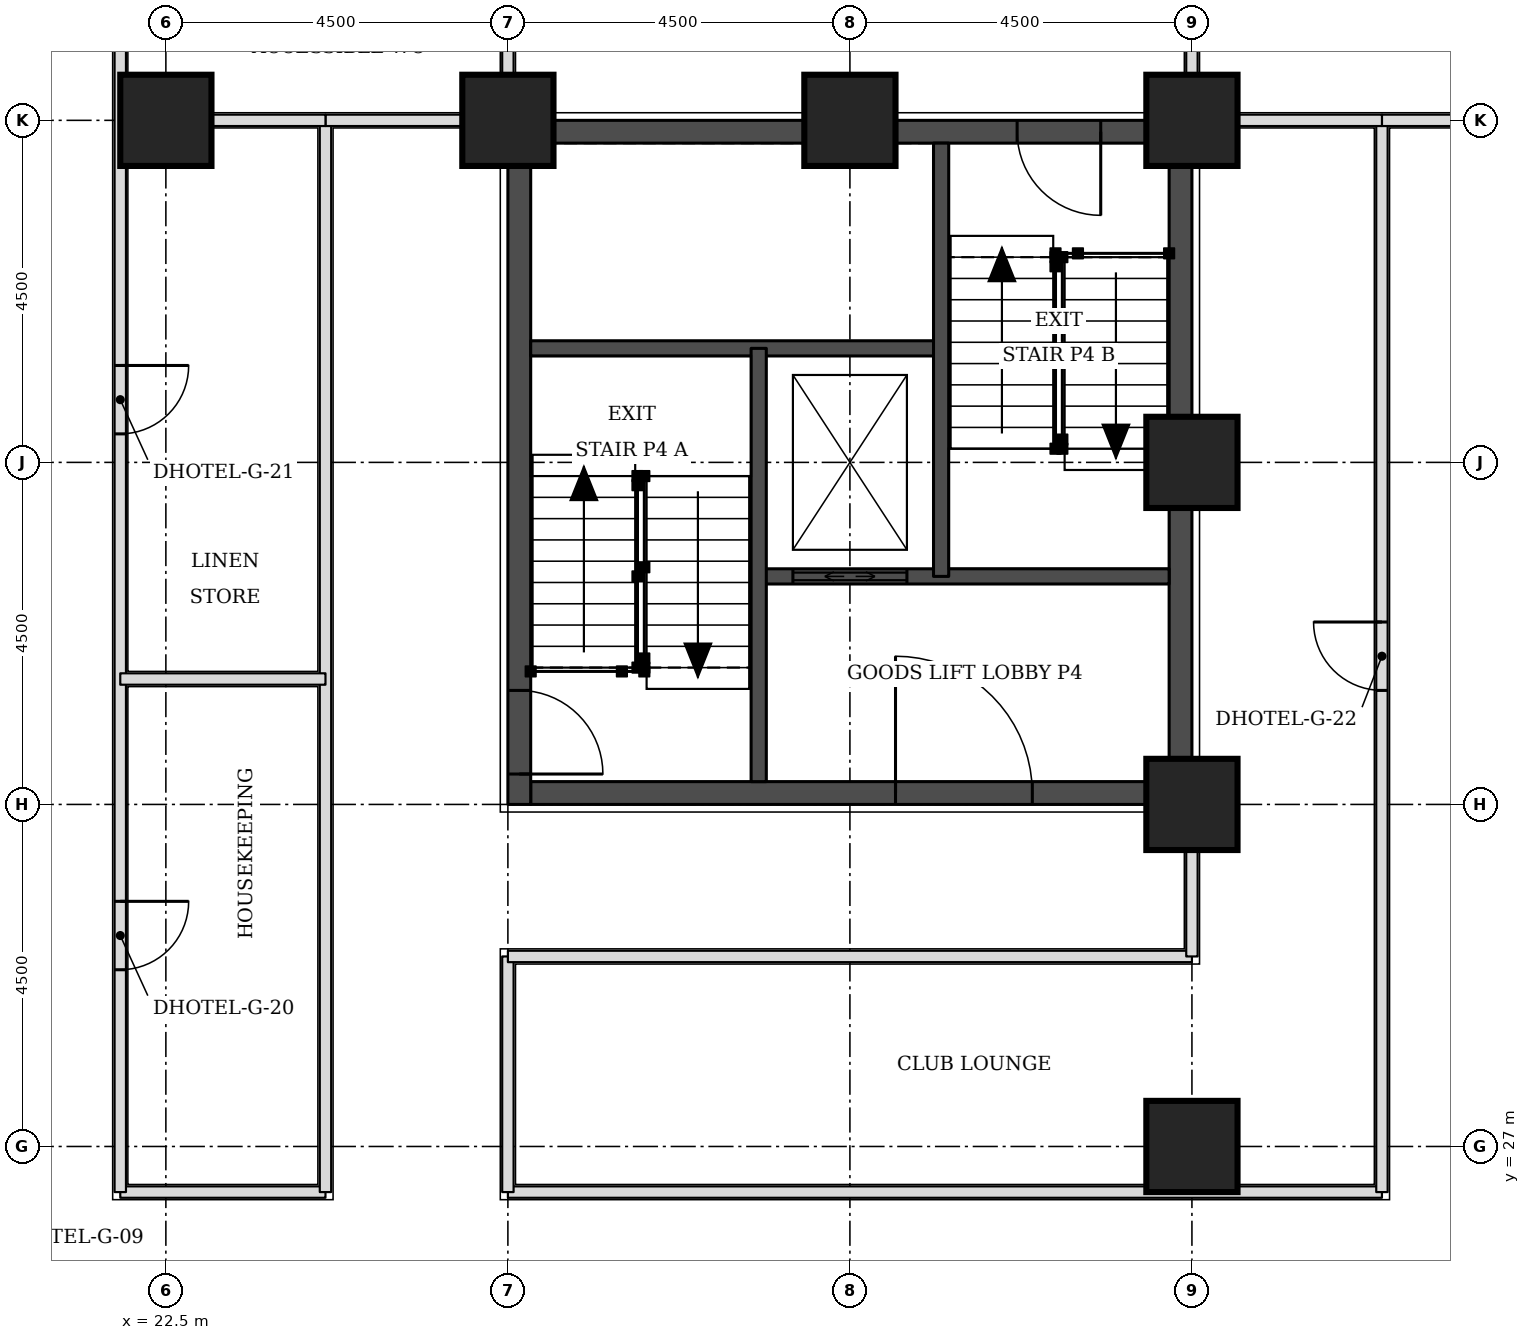
"""IFC4 building model, lengths in metres.
Left out: names, types, materials, properties, quantities, classifications, styles, units other than length and angle.
Written with IfcOpenShell. Run it as: python <this file> out.ifc"""

import sys

from ifc_helpers import new_model, si_unit, direction, frame, frame_2d, origin, origin_2d, place, context, subcontext, project, spatial, rectangle, extrude, element, fill, save


model = new_model("IFC4")
c1 = context("Model", 3, precision=1e-05, world=origin(), true_north=direction((0.0, 1.0)))
c2 = subcontext(c1, "Body", "Model", "MODEL_VIEW")
j1 = project(units=[si_unit("LENGTHUNIT", "METRE"), si_unit("PLANEANGLEUNIT", "RADIAN")], contexts=[c1])
p1 = place(None, origin())
s1 = spatial("IfcSite", under=j1, at=p1, CompositionType="ELEMENT")
p2 = place(p1, origin())
s2 = spatial("IfcBuilding", under=s1, at=p2, CompositionType="ELEMENT")
p3 = place(p2, frame((0.0, 0.0, 66.0)))
s3 = spatial("IfcBuildingStorey", under=s2, at=p3, CompositionType="ELEMENT", Elevation=66.0)
for number, where, z_axis, x_axis in (
    (1, (36.0, 27.0, 0.0), (0.0, 0.0, 1.0), (1.0, 0.0, 0.0)),
    (2, (36.0, 31.5, 0.0), (0.0, 0.0, 1.0), (1.0, 0.0, 0.0)),
    (3, (36.0, 36.0, 0.0), (0.0, 0.0, 1.0), (1.0, 0.0, 0.0)),
    (4, (22.5, 40.5, 0.0), (0.0, 0.0, 1.0), (1.0, 0.0, 0.0)),
    (5, (27.0, 40.5, 0.0), (0.0, 0.0, 1.0), (1.0, 0.0, 0.0)),
    (6, (31.5, 40.5, 0.0), (0.0, 0.0, 1.0), (1.0, 0.0, 0.0)),
    (7, (36.0, 40.5, 0.0), (0.0, 0.0, 1.0), (1.0, 0.0, 0.0)),
):
    element("IfcColumn", number, at=place(p3, frame(where, z_axis=z_axis, x_axis=x_axis)), inside=s3, PredefinedType="COLUMN", context=c2, shape_type="SweptSolid", body=[
        extrude(rectangle(XDim=1.2, YDim=1.2, at=origin_2d()), origin(), (0.0, 0.0, 1.0), 3.3),
    ])
p4 = place(p3, frame((27.3, 31.65, 0.0), z_axis=(0.0, 0.0, 1.0), x_axis=(1.0, 0.0, 0.0)))
e8 = element("IfcWall", 8, at=p4, inside=s3, PredefinedType="SHEAR", context=c2, shape_type="SweptSolid", body=[
    extrude(rectangle(XDim=8.4, YDim=0.3, at=frame_2d((4.2, 0.0))), origin(), (0.0, 0.0, 1.0), 3.3),
])
p5 = place(p4, frame((4.8, 0.0, 0.0)))
e9 = element("IfcOpeningElement", 9, at=p5, cuts=e8, PredefinedType="OPENING", context=c2, shape_type="SweptSolid", body=[
    extrude(rectangle(XDim=1.8, YDim=2.1, at=frame_2d((0.9, 1.05))), frame((0.0, 0.16, 0.0), z_axis=(0.0, -1.0, 0.0), x_axis=(1.0, 0.0, 0.0)), (0.0, 0.0, 1.0), 0.32),
])
p6 = place(p3, frame((27.3, 40.35, 0.0), z_axis=(0.0, 0.0, 1.0), x_axis=(1.0, 0.0, 0.0)))
e10 = element("IfcWall", 10, at=p6, inside=s3, PredefinedType="SHEAR", context=c2, shape_type="SweptSolid", body=[
    extrude(rectangle(XDim=8.4, YDim=0.3, at=frame_2d((4.2, 0.0))), origin(), (0.0, 0.0, 1.0), 3.3),
])
p7 = place(p6, frame((6.4, 0.0, 0.0)))
e11 = element("IfcOpeningElement", 11, at=p7, cuts=e10, PredefinedType="OPENING", context=c2, shape_type="SweptSolid", body=[
    extrude(rectangle(XDim=1.1, YDim=2.1, at=frame_2d((0.55, 1.05))), frame((0.0, 0.16, 0.0), z_axis=(0.0, -1.0, 0.0), x_axis=(1.0, 0.0, 0.0)), (0.0, 0.0, 1.0), 0.32),
])
p8 = place(p3, frame((27.15, 31.5, 0.0), z_axis=(0.0, 0.0, 1.0), x_axis=(0.0, 1.0, 0.0)))
e12 = element("IfcWall", 12, at=p8, inside=s3, PredefinedType="SHEAR", context=c2, shape_type="SweptSolid", body=[
    extrude(rectangle(XDim=9.0, YDim=0.3, at=frame_2d((4.5, 0.0))), origin(), (0.0, 0.0, 1.0), 3.3),
])
p9 = place(p8, frame((0.4, 0.0, 0.0)))
e13 = element("IfcOpeningElement", 13, at=p9, cuts=e12, PredefinedType="OPENING", context=c2, shape_type="SweptSolid", body=[
    extrude(rectangle(XDim=1.1, YDim=2.1, at=frame_2d((0.55, 1.05))), frame((0.0, 0.16, 0.0), z_axis=(0.0, -1.0, 0.0), x_axis=(1.0, 0.0, 0.0)), (0.0, 0.0, 1.0), 0.32),
])
p10 = place(p3, frame((35.85, 31.5, 0.0), z_axis=(0.0, 0.0, 1.0), x_axis=(0.0, 1.0, 0.0)))
e14 = element("IfcWall", 14, at=p10, inside=s3, PredefinedType="SHEAR", context=c2, shape_type="SweptSolid", body=[
    extrude(rectangle(XDim=9.0, YDim=0.3, at=frame_2d((4.5, 0.0))), origin(), (0.0, 0.0, 1.0), 3.3),
])
p11 = place(p3, frame((21.9, 26.4, 0.0), z_axis=(0.0, 0.0, 1.0), x_axis=(1.0, 0.0, 0.0)))
e15 = element("IfcWall", 15, at=p11, inside=s3, PredefinedType="PARTITIONING", context=c2, shape_type="SweptSolid", body=[
    extrude(rectangle(XDim=2.7, YDim=0.15, at=frame_2d((1.35, 0.0))), origin(), (0.0, 0.0, 1.0), 3.08),
])
p12 = place(p3, frame((21.9, 26.4, 0.0), z_axis=(0.0, 0.0, 1.0), x_axis=(0.0, 1.0, 0.0)))
e16 = element("IfcWall", 16, at=p12, inside=s3, PredefinedType="PARTITIONING", context=c2, shape_type="SweptSolid", body=[
    extrude(rectangle(XDim=16.6, YDim=0.15, at=frame_2d((8.3, 0.0))), origin(), (0.0, 0.0, 1.0), 3.08),
])
p13 = place(p12, frame((2.925, 0.0, 0.0)))
e17 = element("IfcOpeningElement", 17, at=p13, cuts=e16, PredefinedType="OPENING", context=c2, shape_type="SweptSolid", body=[
    extrude(rectangle(XDim=0.9, YDim=2.1, at=frame_2d((0.45, 1.05))), frame((0.0, 0.085, 0.0), z_axis=(0.0, -1.0, 0.0), x_axis=(1.0, 0.0, 0.0)), (0.0, 0.0, 1.0), 0.17),
])
p14 = place(p12, frame((9.975, 0.0, 0.0)))
e18 = element("IfcOpeningElement", 18, at=p14, cuts=e16, PredefinedType="OPENING", context=c2, shape_type="SweptSolid", body=[
    extrude(rectangle(XDim=0.9, YDim=2.1, at=frame_2d((0.45, 1.05))), frame((0.0, 0.085, 0.0), z_axis=(0.0, -1.0, 0.0), x_axis=(1.0, 0.0, 0.0)), (0.0, 0.0, 1.0), 0.17),
])
p15 = place(p3, frame((24.6, 26.4, 0.0), z_axis=(0.0, 0.0, 1.0), x_axis=(0.0, 1.0, 0.0)))
e19 = element("IfcWall", 19, at=p15, inside=s3, PredefinedType="PARTITIONING", context=c2, shape_type="SweptSolid", body=[
    extrude(rectangle(XDim=14.1, YDim=0.15, at=frame_2d((7.05, 0.0))), origin(), (0.0, 0.0, 1.0), 3.08),
])
p16 = place(p3, frame((27.0, 26.4, 0.0), z_axis=(0.0, 0.0, 1.0), x_axis=(1.0, 0.0, 0.0)))
e20 = element("IfcWall", 20, at=p16, inside=s3, PredefinedType="PARTITIONING", context=c2, shape_type="SweptSolid", body=[
    extrude(rectangle(XDim=11.5, YDim=0.15, at=frame_2d((5.75, 0.0))), origin(), (0.0, 0.0, 1.0), 3.08),
])
p17 = place(p3, frame((27.0, 26.4, 0.0), z_axis=(0.0, 0.0, 1.0), x_axis=(0.0, 1.0, 0.0)))
e21 = element("IfcWall", 21, at=p17, inside=s3, PredefinedType="PARTITIONING", context=c2, shape_type="SweptSolid", body=[
    extrude(rectangle(XDim=3.1, YDim=0.15, at=frame_2d((1.55, 0.0))), origin(), (0.0, 0.0, 1.0), 3.08),
])
p18 = place(p3, frame((38.5, 26.4, 0.0), z_axis=(0.0, 0.0, 1.0), x_axis=(0.0, 1.0, 0.0)))
e22 = element("IfcWall", 22, at=p18, inside=s3, PredefinedType="PARTITIONING", context=c2, shape_type="SweptSolid", body=[
    extrude(rectangle(XDim=14.1, YDim=0.15, at=frame_2d((7.05, 0.0))), origin(), (0.0, 0.0, 1.0), 3.08),
])
p19 = place(p18, frame((6.6, 0.0, 0.0)))
e23 = element("IfcOpeningElement", 23, at=p19, cuts=e22, PredefinedType="OPENING", context=c2, shape_type="SweptSolid", body=[
    extrude(rectangle(XDim=0.9, YDim=2.1, at=frame_2d((0.45, 1.05))), frame((0.0, 0.085, 0.0), z_axis=(0.0, -1.0, 0.0), x_axis=(1.0, 0.0, 0.0)), (0.0, 0.0, 1.0), 0.17),
])
p20 = place(p3, frame((27.0, 29.5, 0.0), z_axis=(0.0, 0.0, 1.0), x_axis=(1.0, 0.0, 0.0)))
e24 = element("IfcWall", 24, at=p20, inside=s3, PredefinedType="PARTITIONING", context=c2, shape_type="SweptSolid", body=[
    extrude(rectangle(XDim=9.0, YDim=0.15, at=frame_2d((4.5, 0.0))), origin(), (0.0, 0.0, 1.0), 3.08),
])
p21 = place(p3, frame((36.0, 29.5, 0.0), z_axis=(0.0, 0.0, 1.0), x_axis=(0.0, 1.0, 0.0)))
e25 = element("IfcWall", 25, at=p21, inside=s3, PredefinedType="PARTITIONING", context=c2, shape_type="SweptSolid", body=[
    extrude(rectangle(XDim=1.95, YDim=0.15, at=frame_2d((0.975, 0.0))), origin(), (0.0, 0.0, 1.0), 2.33),
])
p22 = place(p3, frame((24.6, 40.5, 0.0), z_axis=(0.0, 0.0, 1.0), x_axis=(1.0, 0.0, 0.0)))
e26 = element("IfcWall", 26, at=p22, inside=s3, PredefinedType="PARTITIONING", context=c2, shape_type="SweptSolid", body=[
    extrude(rectangle(XDim=2.35, YDim=0.15, at=frame_2d((1.175, 0.0))), origin(), (0.0, 0.0, 1.0), 2.33),
])
p23 = place(p3, frame((38.5, 40.5, 0.0), z_axis=(0.0, 0.0, 1.0), x_axis=(1.0, 0.0, 0.0)))
e27 = element("IfcWall", 27, at=p23, inside=s3, PredefinedType="PARTITIONING", context=c2, shape_type="SweptSolid", body=[
    extrude(rectangle(XDim=1.95, YDim=0.15, at=frame_2d((0.975, 0.0))), origin(), (0.0, 0.0, 1.0), 2.33),
])
p24 = place(p3, frame((27.0, 40.55, 0.0), z_axis=(0.0, 0.0, 1.0), x_axis=(0.0, 1.0, 0.0)))
e28 = element("IfcWall", 28, at=p24, inside=s3, PredefinedType="PARTITIONING", context=c2, shape_type="SweptSolid", body=[
    extrude(rectangle(XDim=2.45, YDim=0.15, at=frame_2d((1.225, 0.0))), origin(), (0.0, 0.0, 1.0), 3.08),
])
p25 = place(p3, frame((36.0, 40.55, 0.0), z_axis=(0.0, 0.0, 1.0), x_axis=(0.0, 1.0, 0.0)))
e29 = element("IfcWall", 29, at=p25, inside=s3, PredefinedType="PARTITIONING", context=c2, shape_type="SweptSolid", body=[
    extrude(rectangle(XDim=4.4, YDim=0.15, at=frame_2d((2.2, 0.0))), origin(), (0.0, 0.0, 1.0), 2.33),
])
p26 = place(p3, frame((21.9, 33.15, 0.0), z_axis=(0.0, 0.0, 1.0), x_axis=(1.0, 0.0, 0.0)))
e30 = element("IfcWall", 30, at=p26, inside=s3, PredefinedType="PARTITIONING", context=c2, shape_type="SweptSolid", body=[
    extrude(rectangle(XDim=2.7, YDim=0.15, at=frame_2d((1.35, 0.0))), origin(), (0.0, 0.0, 1.0), 3.08),
])
p27 = place(p3, frame((21.9, 40.5, 0.0), z_axis=(0.0, 0.0, 1.0), x_axis=(1.0, 0.0, 0.0)))
e31 = element("IfcWall", 31, at=p27, inside=s3, PredefinedType="PARTITIONING", context=c2, shape_type="SweptSolid", body=[
    extrude(rectangle(XDim=2.7, YDim=0.15, at=frame_2d((1.35, 0.0))), origin(), (0.0, 0.0, 1.0), 2.33),
])
p28 = place(p3, frame((36.05, 40.5, 0.0), z_axis=(0.0, 0.0, 1.0), x_axis=(1.0, 0.0, 0.0)))
e32 = element("IfcWall", 32, at=p28, inside=s3, PredefinedType="PARTITIONING", context=c2, shape_type="SweptSolid", body=[
    extrude(rectangle(XDim=2.45, YDim=0.15, at=frame_2d((1.225, 0.0))), origin(), (0.0, 0.0, 1.0), 2.33),
])
p29 = place(p3, frame((30.3, 34.5, 0.0), z_axis=(0.0, 0.0, 1.0), x_axis=(1.0, 0.0, 0.0)))
e33 = element("IfcWall", 33, at=p29, inside=s3, PredefinedType="SOLIDWALL", context=c2, shape_type="SweptSolid", body=[
    extrude(rectangle(XDim=5.4, YDim=0.2, at=frame_2d((2.7, 0.0))), origin(), (0.0, 0.0, 1.0), 3.08),
])
p30 = place(p29, frame((0.45, 0.0, 0.0)))
e34 = element("IfcOpeningElement", 34, at=p30, cuts=e33, PredefinedType="OPENING", context=c2, shape_type="SweptSolid", body=[
    extrude(rectangle(XDim=1.5, YDim=2.1, at=frame_2d((0.75, 1.05))), frame((0.0, 0.11, 0.0), z_axis=(0.0, -1.0, 0.0), x_axis=(1.0, 0.0, 0.0)), (0.0, 0.0, 1.0), 0.22),
])
p31 = place(p3, frame((27.3, 37.5, 0.0), z_axis=(0.0, 0.0, 1.0), x_axis=(1.0, 0.0, 0.0)))
e35 = element("IfcWall", 35, at=p31, inside=s3, PredefinedType="SOLIDWALL", context=c2, shape_type="SweptSolid", body=[
    extrude(rectangle(XDim=5.4, YDim=0.2, at=frame_2d((2.7, 0.0))), origin(), (0.0, 0.0, 1.0), 3.08),
])
for number, where, z_axis, x_axis in (
    (36, (30.3, 31.8, 0.0), (0.0, 0.0, 1.0), (0.0, 1.0, 0.0)),
    (37, (32.7, 34.5, 0.0), (0.0, 0.0, 1.0), (0.0, 1.0, 0.0)),
):
    element("IfcWall", number, at=place(p3, frame(where, z_axis=z_axis, x_axis=x_axis)), inside=s3, PredefinedType="SOLIDWALL", context=c2, shape_type="SweptSolid", body=[
        extrude(rectangle(XDim=5.7, YDim=0.2, at=frame_2d((2.85, 0.0))), origin(), (0.0, 0.0, 1.0), 3.08),
    ])
p32 = place(p13, frame((0.9, 0.0, 0.0), z_axis=(0.0, 0.0, 1.0), x_axis=(-1.0, 0.0, 0.0)))
e38 = element("IfcDoor", 38, at=p32, inside=s3, OperationType="SINGLE_SWING_LEFT", PredefinedType="DOOR", context=c2, shape_type="SweptSolid", body=[
    extrude(rectangle(XDim=0.9, YDim=2.1, at=frame_2d((0.45, 1.05))), frame((0.0, 0.025, 0.0), z_axis=(0.0, -1.0, 0.0), x_axis=(1.0, 0.0, 0.0)), (0.0, 0.0, 1.0), 0.05),
])
fill(e17, e38)
p33 = place(p14, frame((0.9, 0.0, 0.0), z_axis=(0.0, 0.0, 1.0), x_axis=(-1.0, 0.0, 0.0)))
e39 = element("IfcDoor", 39, at=p33, inside=s3, OperationType="SINGLE_SWING_LEFT", PredefinedType="DOOR", context=c2, shape_type="SweptSolid", body=[
    extrude(rectangle(XDim=0.9, YDim=2.1, at=frame_2d((0.45, 1.05))), frame((0.0, 0.025, 0.0), z_axis=(0.0, -1.0, 0.0), x_axis=(1.0, 0.0, 0.0)), (0.0, 0.0, 1.0), 0.05),
])
fill(e18, e39)
p34 = place(p19, origin())
e40 = element("IfcDoor", 40, at=p34, inside=s3, OperationType="SINGLE_SWING_RIGHT", PredefinedType="DOOR", context=c2, shape_type="SweptSolid", body=[
    extrude(rectangle(XDim=0.9, YDim=2.1, at=frame_2d((0.45, 1.05))), frame((0.0, 0.025, 0.0), z_axis=(0.0, -1.0, 0.0), x_axis=(1.0, 0.0, 0.0)), (0.0, 0.0, 1.0), 0.05),
])
fill(e23, e40)
p35 = place(p9, frame((1.1, 0.0, 0.0), z_axis=(0.0, 0.0, 1.0), x_axis=(-1.0, 0.0, 0.0)))
e41 = element("IfcDoor", 41, at=p35, inside=s3, OperationType="SINGLE_SWING_RIGHT", PredefinedType="DOOR", context=c2, shape_type="SweptSolid", body=[
    extrude(rectangle(XDim=1.1, YDim=2.1, at=frame_2d((0.55, 1.05))), frame((0.0, 0.025, 0.0), z_axis=(0.0, -1.0, 0.0), x_axis=(1.0, 0.0, 0.0)), (0.0, 0.0, 1.0), 0.05),
])
fill(e13, e41)
p36 = place(p7, frame((1.1, 0.0, 0.0), z_axis=(0.0, 0.0, 1.0), x_axis=(-1.0, 0.0, 0.0)))
e42 = element("IfcDoor", 42, at=p36, inside=s3, OperationType="SINGLE_SWING_LEFT", PredefinedType="DOOR", context=c2, shape_type="SweptSolid", body=[
    extrude(rectangle(XDim=1.1, YDim=2.1, at=frame_2d((0.55, 1.05))), frame((0.0, 0.025, 0.0), z_axis=(0.0, -1.0, 0.0), x_axis=(1.0, 0.0, 0.0)), (0.0, 0.0, 1.0), 0.05),
])
fill(e11, e42)
p37 = place(p30, origin())
e43 = element("IfcDoor", 43, at=p37, inside=s3, OperationType="DOUBLE_DOOR_SLIDING", PredefinedType="DOOR", context=c2, shape_type="SweptSolid", body=[
    extrude(rectangle(XDim=1.5, YDim=2.1, at=frame_2d((0.75, 1.05))), frame((0.0, 0.025, 0.0), z_axis=(0.0, -1.0, 0.0), x_axis=(1.0, 0.0, 0.0)), (0.0, 0.0, 1.0), 0.05),
])
fill(e34, e43)
p38 = place(p5, origin())
e44 = element("IfcDoor", 44, at=p38, inside=s3, OperationType="SINGLE_SWING_LEFT", PredefinedType="DOOR", context=c2, shape_type="SweptSolid", body=[
    extrude(rectangle(XDim=1.8, YDim=2.1, at=frame_2d((0.9, 1.05))), frame((0.0, 0.025, 0.0), z_axis=(0.0, -1.0, 0.0), x_axis=(1.0, 0.0, 0.0)), (0.0, 0.0, 1.0), 0.05),
])
fill(e9, e44)
save(model, sys.argv[1])
